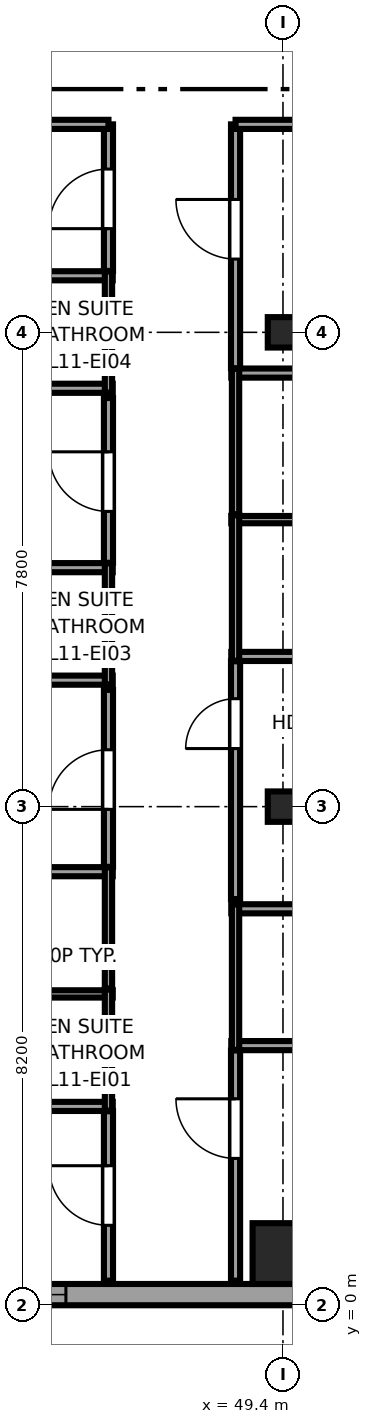
"""IFC4 building model, lengths in metres.
Left out: names, types, materials, properties, quantities, classifications, styles, units other than length and angle.
Written with IfcOpenShell. Run it as: python <this file> out.ifc"""

import sys

from ifc_helpers import new_model, si_unit, direction, frame, frame_2d, origin, origin_2d, place, context, subcontext, project, spatial, rectangle, i_section, extrude, source, transform, mapped, element, fill, save


model = new_model("IFC4")
c1 = context("Model", 3, precision=1e-05, world=origin(), true_north=direction((0.0, 1.0)))
c2 = subcontext(c1, "Body", "Model", "MODEL_VIEW")
j1 = project(units=[si_unit("LENGTHUNIT", "METRE"), si_unit("PLANEANGLEUNIT", "RADIAN")], contexts=[c1])
p1 = place(None, origin())
s1 = spatial("IfcSite", under=j1, at=p1, CompositionType="ELEMENT")
p2 = place(p1, origin())
s2 = spatial("IfcBuilding", under=s1, at=p2, CompositionType="ELEMENT")
p3 = place(p2, frame((0.0, 0.0, 49.75)))
s3 = spatial("IfcBuildingStorey", under=s2, at=p3, CompositionType="ELEMENT", Elevation=49.75)
m1 = source(origin(), c2, "Body", "SweptSolid", [
    extrude(rectangle(XDim=1.0, YDim=1.0, at=origin_2d()), origin(), (0.0, 0.0, 1.0), 3.55),
])
p4 = place(p3, frame((49.4, 0.85, 0.0), z_axis=(0.0, 0.0, 1.0), x_axis=(1.0, 0.0, 0.0)))
e1 = element("IfcColumn", 1, at=p4, inside=s3, PredefinedType="COLUMN", context=c2, shape_type="MappedRepresentation", body=[
    mapped(m1, transform((0.0, 0.0, 0.0), x_axis=(1.0, 0.0, 0.0), y_axis=(0.0, 1.0, 0.0), z_axis=(0.0, 0.0, 1.0), scale=1.0)),
])
m2 = source(origin(), c2, "Body", "SweptSolid", [
    extrude(i_section(OverallWidth=0.5, OverallDepth=0.5, WebThickness=0.028, FlangeThickness=0.045, at=origin_2d()), origin(), (0.0, 0.0, 1.0), 3.55),
])
for number, where, z_axis, x_axis in (
    (2, (49.4, 8.2, 0.0), (0.0, 0.0, 1.0), (1.0, 0.0, 0.0)),
    (3, (49.4, 16.0, 0.0), (0.0, 0.0, 1.0), (1.0, 0.0, 0.0)),
):
    element("IfcColumn", number, at=place(p3, frame(where, z_axis=z_axis, x_axis=x_axis)), inside=s3, PredefinedType="COLUMN", context=c2, shape_type="MappedRepresentation", body=[
        mapped(m2, transform((0.0, 0.0, 0.0), x_axis=(1.0, 0.0, 0.0), y_axis=(0.0, 1.0, 0.0), z_axis=(0.0, 0.0, 1.0), scale=1.0)),
    ])
p5 = place(p3, frame((34.375, 0.175, 0.0), z_axis=(0.0, 0.0, 1.0), x_axis=(1.0, 0.0, 0.0)))
e4 = element("IfcWall", 4, at=p5, inside=s3, PredefinedType="SOLIDWALL", context=c2, shape_type="SweptSolid", body=[
    extrude(rectangle(XDim=18.008, YDim=0.35, at=frame_2d((9.004, 0.0))), origin(), (0.0, 0.0, 1.0), 3.37),
])
p6 = place(p5, frame((1.801, 0.0, 0.68)))
e5 = element("IfcOpeningElement", 5, at=p6, cuts=e4, PredefinedType="OPENING", context=c2, shape_type="SweptSolid", body=[
    extrude(rectangle(XDim=1.8, YDim=1.85, at=frame_2d((0.9, 0.925))), frame((0.0, 0.185, 0.0), z_axis=(0.0, -1.0, 0.0), x_axis=(1.0, 0.0, 0.0)), (0.0, 0.0, 1.0), 0.37),
])
p7 = place(p5, frame((9.655, 0.0, 0.68)))
e6 = element("IfcOpeningElement", 6, at=p7, cuts=e4, PredefinedType="OPENING", context=c2, shape_type="SweptSolid", body=[
    extrude(rectangle(XDim=1.8, YDim=1.85, at=frame_2d((0.9, 0.925))), frame((0.0, 0.185, 0.0), z_axis=(0.0, -1.0, 0.0), x_axis=(1.0, 0.0, 0.0)), (0.0, 0.0, 1.0), 0.37),
])
p8 = place(p5, frame((15.725, 0.0, 0.62)))
e7 = element("IfcOpeningElement", 7, at=p8, cuts=e4, PredefinedType="OPENING", context=c2, shape_type="SweptSolid", body=[
    extrude(rectangle(XDim=1.5, YDim=1.55, at=frame_2d((0.75, 0.775))), frame((0.0, 0.185, 0.0), z_axis=(0.0, -1.0, 0.0), x_axis=(1.0, 0.0, 0.0)), (0.0, 0.0, 1.0), 0.37),
])
p9 = place(p3, frame((44.01, 3.27, 0.0), z_axis=(0.0, 0.0, 1.0), x_axis=(1.0, 0.0, 0.0)))
e8 = element("IfcWall", 8, at=p9, inside=s3, PredefinedType="PARTITIONING", context=c2, shape_type="SweptSolid", body=[
    extrude(rectangle(XDim=2.59, YDim=0.15, at=frame_2d((1.295, 0.0))), origin(), (0.0, 0.0, 1.0), 3.37),
])
p10 = place(p3, frame((44.01, 5.12, 0.0), z_axis=(0.0, 0.0, 1.0), x_axis=(1.0, 0.0, 0.0)))
e9 = element("IfcWall", 9, at=p10, inside=s3, PredefinedType="PLUMBINGWALL", context=c2, shape_type="SweptSolid", body=[
    extrude(rectangle(XDim=2.59, YDim=0.12, at=frame_2d((1.295, 0.0))), origin(), (0.0, 0.0, 1.0), 3.37),
])
p11 = place(p3, frame((46.53, 3.2, 0.0), z_axis=(0.0, 0.0, 1.0), x_axis=(0.0, 1.0, 0.0)))
e10 = element("IfcWall", 10, at=p11, inside=s3, PredefinedType="PLUMBINGWALL", context=c2, shape_type="SweptSolid", body=[
    extrude(rectangle(XDim=1.99, YDim=0.12, at=frame_2d((0.995, 0.0))), origin(), (0.0, 0.0, 1.0), 3.37),
])
p12 = place(p3, frame((44.01, 7.13, 0.0), z_axis=(0.0, 0.0, 1.0), x_axis=(1.0, 0.0, 0.0)))
e11 = element("IfcWall", 11, at=p12, inside=s3, PredefinedType="PARTITIONING", context=c2, shape_type="SweptSolid", body=[
    extrude(rectangle(XDim=2.59, YDim=0.15, at=frame_2d((1.295, 0.0))), origin(), (0.0, 0.0, 1.0), 3.37),
])
p13 = place(p3, frame((46.53, 5.21, 0.0), z_axis=(0.0, 0.0, 1.0), x_axis=(0.0, 1.0, 0.0)))
e12 = element("IfcWall", 12, at=p13, inside=s3, PredefinedType="PLUMBINGWALL", context=c2, shape_type="SweptSolid", body=[
    extrude(rectangle(XDim=1.99, YDim=0.12, at=frame_2d((0.995, 0.0))), origin(), (0.0, 0.0, 1.0), 3.37),
])
p14 = place(p3, frame((34.65, 10.28, 0.0), z_axis=(0.0, 0.0, 1.0), x_axis=(1.0, 0.0, 0.0)))
e13 = element("IfcWall", 13, at=p14, inside=s3, PredefinedType="PARTITIONING", context=c2, shape_type="SweptSolid", body=[
    extrude(rectangle(XDim=11.95, YDim=0.15, at=frame_2d((5.975, 0.0))), origin(), (0.0, 0.0, 1.0), 3.37),
])
p15 = place(p3, frame((44.01, 12.13, 0.0), z_axis=(0.0, 0.0, 1.0), x_axis=(1.0, 0.0, 0.0)))
e14 = element("IfcWall", 14, at=p15, inside=s3, PredefinedType="PARTITIONING", context=c2, shape_type="SweptSolid", body=[
    extrude(rectangle(XDim=2.59, YDim=0.15, at=frame_2d((1.295, 0.0))), origin(), (0.0, 0.0, 1.0), 3.37),
])
p16 = place(p3, frame((46.53, 10.21, 0.0), z_axis=(0.0, 0.0, 1.0), x_axis=(0.0, 1.0, 0.0)))
e15 = element("IfcWall", 15, at=p16, inside=s3, PredefinedType="PLUMBINGWALL", context=c2, shape_type="SweptSolid", body=[
    extrude(rectangle(XDim=1.99, YDim=0.12, at=frame_2d((0.995, 0.0))), origin(), (0.0, 0.0, 1.0), 3.37),
])
p17 = place(p3, frame((34.65, 15.08, 0.0), z_axis=(0.0, 0.0, 1.0), x_axis=(1.0, 0.0, 0.0)))
e16 = element("IfcWall", 16, at=p17, inside=s3, PredefinedType="PARTITIONING", context=c2, shape_type="SweptSolid", body=[
    extrude(rectangle(XDim=11.95, YDim=0.15, at=frame_2d((5.975, 0.0))), origin(), (0.0, 0.0, 1.0), 3.37),
])
p18 = place(p3, frame((44.01, 16.93, 0.0), z_axis=(0.0, 0.0, 1.0), x_axis=(1.0, 0.0, 0.0)))
e17 = element("IfcWall", 17, at=p18, inside=s3, PredefinedType="PARTITIONING", context=c2, shape_type="SweptSolid", body=[
    extrude(rectangle(XDim=2.59, YDim=0.15, at=frame_2d((1.295, 0.0))), origin(), (0.0, 0.0, 1.0), 3.37),
])
p19 = place(p3, frame((46.53, 15.01, 0.0), z_axis=(0.0, 0.0, 1.0), x_axis=(0.0, 1.0, 0.0)))
e18 = element("IfcWall", 18, at=p19, inside=s3, PredefinedType="PLUMBINGWALL", context=c2, shape_type="SweptSolid", body=[
    extrude(rectangle(XDim=1.99, YDim=0.12, at=frame_2d((0.995, 0.0))), origin(), (0.0, 0.0, 1.0), 3.37),
])
for number, where, z_axis, x_axis in (
    (19, (48.55, 4.27, 0.0), (0.0, 0.0, 1.0), (1.0, 0.0, 0.0)),
    (20, (48.55, 6.52, 0.0), (0.0, 0.0, 1.0), (1.0, 0.0, 0.0)),
):
    element("IfcWall", number, at=place(p3, frame(where, z_axis=z_axis, x_axis=x_axis)), inside=s3, PredefinedType="PARTITIONING", context=c2, shape_type="SweptSolid", body=[
        extrude(rectangle(XDim=2.59, YDim=0.15, at=frame_2d((1.295, 0.0))), origin(), (0.0, 0.0, 1.0), 3.37),
    ])
p20 = place(p3, frame((48.62, 4.2, 0.0), z_axis=(0.0, 0.0, 1.0), x_axis=(0.0, 1.0, 0.0)))
e21 = element("IfcWall", 21, at=p20, inside=s3, PredefinedType="PLUMBINGWALL", context=c2, shape_type="SweptSolid", body=[
    extrude(rectangle(XDim=2.39, YDim=0.12, at=frame_2d((1.195, 0.0))), origin(), (0.0, 0.0, 1.0), 3.37),
])
p21 = place(p3, frame((48.55, 10.67, 0.0), z_axis=(0.0, 0.0, 1.0), x_axis=(1.0, 0.0, 0.0)))
e22 = element("IfcWall", 22, at=p21, inside=s3, PredefinedType="PARTITIONING", context=c2, shape_type="SweptSolid", body=[
    extrude(rectangle(XDim=2.59, YDim=0.15, at=frame_2d((1.295, 0.0))), origin(), (0.0, 0.0, 1.0), 3.37),
])
p22 = place(p3, frame((48.55, 12.92, 0.0), z_axis=(0.0, 0.0, 1.0), x_axis=(1.0, 0.0, 0.0)))
e23 = element("IfcWall", 23, at=p22, inside=s3, PredefinedType="PLUMBINGWALL", context=c2, shape_type="SweptSolid", body=[
    extrude(rectangle(XDim=2.59, YDim=0.12, at=frame_2d((1.295, 0.0))), origin(), (0.0, 0.0, 1.0), 3.37),
])
p23 = place(p3, frame((48.62, 10.6, 0.0), z_axis=(0.0, 0.0, 1.0), x_axis=(0.0, 1.0, 0.0)))
e24 = element("IfcWall", 24, at=p23, inside=s3, PredefinedType="PLUMBINGWALL", context=c2, shape_type="SweptSolid", body=[
    extrude(rectangle(XDim=2.39, YDim=0.12, at=frame_2d((1.195, 0.0))), origin(), (0.0, 0.0, 1.0), 3.37),
])
p24 = place(p3, frame((48.55, 15.33, 0.0), z_axis=(0.0, 0.0, 1.0), x_axis=(1.0, 0.0, 0.0)))
e25 = element("IfcWall", 25, at=p24, inside=s3, PredefinedType="PARTITIONING", context=c2, shape_type="SweptSolid", body=[
    extrude(rectangle(XDim=2.59, YDim=0.15, at=frame_2d((1.295, 0.0))), origin(), (0.0, 0.0, 1.0), 3.37),
])
p25 = place(p3, frame((48.62, 13.01, 0.0), z_axis=(0.0, 0.0, 1.0), x_axis=(0.0, 1.0, 0.0)))
e26 = element("IfcWall", 26, at=p25, inside=s3, PredefinedType="PLUMBINGWALL", context=c2, shape_type="SweptSolid", body=[
    extrude(rectangle(XDim=2.39, YDim=0.12, at=frame_2d((1.195, 0.0))), origin(), (0.0, 0.0, 1.0), 3.37),
])
p26 = place(p3, frame((46.53, 0.405, 0.0), z_axis=(0.0, 0.0, 1.0), x_axis=(0.0, 1.0, 0.0)))
e27 = element("IfcWall", 27, at=p26, inside=s3, PredefinedType="PARTITIONING", context=c2, shape_type="SweptSolid", body=[
    extrude(rectangle(XDim=2.785, YDim=0.15, at=frame_2d((1.393, 0.0))), origin(), (0.0, 0.0, 1.0), 3.37),
])
p27 = place(p26, frame((0.91, 0.0, 0.0)))
e28 = element("IfcOpeningElement", 28, at=p27, cuts=e27, PredefinedType="OPENING", context=c2, shape_type="SweptSolid", body=[
    extrude(rectangle(XDim=0.98, YDim=2.12, at=frame_2d((0.49, 1.06))), frame((0.0, 0.085, 0.0), z_axis=(0.0, -1.0, 0.0), x_axis=(1.0, 0.0, 0.0)), (0.0, 0.0, 1.0), 0.17),
])
p28 = place(p3, frame((46.53, 7.21, 0.0), z_axis=(0.0, 0.0, 1.0), x_axis=(0.0, 1.0, 0.0)))
e29 = element("IfcWall", 29, at=p28, inside=s3, PredefinedType="PARTITIONING", context=c2, shape_type="SweptSolid", body=[
    extrude(rectangle(XDim=2.91, YDim=0.15, at=frame_2d((1.455, 0.0))), origin(), (0.0, 0.0, 1.0), 3.37),
])
p29 = place(p28, frame((0.945, 0.0, 0.0)))
e30 = element("IfcOpeningElement", 30, at=p29, cuts=e29, PredefinedType="OPENING", context=c2, shape_type="SweptSolid", body=[
    extrude(rectangle(XDim=0.98, YDim=2.12, at=frame_2d((0.49, 1.06))), frame((0.0, 0.085, 0.0), z_axis=(0.0, -1.0, 0.0), x_axis=(1.0, 0.0, 0.0)), (0.0, 0.0, 1.0), 0.17),
])
p30 = place(p3, frame((46.53, 12.21, 0.0), z_axis=(0.0, 0.0, 1.0), x_axis=(0.0, 1.0, 0.0)))
e31 = element("IfcWall", 31, at=p30, inside=s3, PredefinedType="PARTITIONING", context=c2, shape_type="SweptSolid", body=[
    extrude(rectangle(XDim=2.71, YDim=0.15, at=frame_2d((1.355, 0.0))), origin(), (0.0, 0.0, 1.0), 3.37),
])
p31 = place(p30, frame((0.845, 0.0, 0.0)))
e32 = element("IfcOpeningElement", 32, at=p31, cuts=e31, PredefinedType="OPENING", context=c2, shape_type="SweptSolid", body=[
    extrude(rectangle(XDim=0.98, YDim=2.12, at=frame_2d((0.49, 1.06))), frame((0.0, 0.085, 0.0), z_axis=(0.0, -1.0, 0.0), x_axis=(1.0, 0.0, 0.0)), (0.0, 0.0, 1.0), 0.17),
])
p32 = place(p3, frame((46.53, 17.01, 0.0), z_axis=(0.0, 0.0, 1.0), x_axis=(0.0, 1.0, 0.0)))
e33 = element("IfcWall", 33, at=p32, inside=s3, PredefinedType="PARTITIONING", context=c2, shape_type="SweptSolid", body=[
    extrude(rectangle(XDim=2.41, YDim=0.15, at=frame_2d((1.205, 0.0))), origin(), (0.0, 0.0, 1.0), 3.37),
])
p33 = place(p32, frame((0.695, 0.0, 0.0)))
e34 = element("IfcOpeningElement", 34, at=p33, cuts=e33, PredefinedType="OPENING", context=c2, shape_type="SweptSolid", body=[
    extrude(rectangle(XDim=0.98, YDim=2.12, at=frame_2d((0.49, 1.06))), frame((0.0, 0.085, 0.0), z_axis=(0.0, -1.0, 0.0), x_axis=(1.0, 0.0, 0.0)), (0.0, 0.0, 1.0), 0.17),
])
p34 = place(p3, frame((34.65, 19.42, 0.0), z_axis=(0.0, 0.0, 1.0), x_axis=(1.0, 0.0, 0.0)))
e35 = element("IfcWall", 35, at=p34, inside=s3, PredefinedType="PARTITIONING", context=c2, shape_type="SweptSolid", body=[
    extrude(rectangle(XDim=11.88, YDim=0.15, at=frame_2d((5.94, 0.0))), origin(), (0.0, 0.0, 1.0), 3.37),
])
p35 = place(p3, frame((48.62, 0.405, 0.0), z_axis=(0.0, 0.0, 1.0), x_axis=(0.0, 1.0, 0.0)))
e36 = element("IfcWall", 36, at=p35, inside=s3, PredefinedType="PARTITIONING", context=c2, shape_type="SweptSolid", body=[
    extrude(rectangle(XDim=3.785, YDim=0.15, at=frame_2d((1.893, 0.0))), origin(), (0.0, 0.0, 1.0), 3.37),
])
p36 = place(p35, frame((2.01, 0.0, 0.0)))
e37 = element("IfcOpeningElement", 37, at=p36, cuts=e36, PredefinedType="OPENING", context=c2, shape_type="SweptSolid", body=[
    extrude(rectangle(XDim=0.98, YDim=2.12, at=frame_2d((0.49, 1.06))), frame((0.0, 0.085, 0.0), z_axis=(0.0, -1.0, 0.0), x_axis=(1.0, 0.0, 0.0)), (0.0, 0.0, 1.0), 0.17),
])
p37 = place(p3, frame((48.62, 6.68, 0.0), z_axis=(0.0, 0.0, 1.0), x_axis=(0.0, 1.0, 0.0)))
e38 = element("IfcWall", 38, at=p37, inside=s3, PredefinedType="PARTITIONING", context=c2, shape_type="SweptSolid", body=[
    extrude(rectangle(XDim=3.91, YDim=0.15, at=frame_2d((1.955, 0.0))), origin(), (0.0, 0.0, 1.0), 3.37),
])
p38 = place(p37, frame((2.475, 0.0, 0.0)))
e39 = element("IfcOpeningElement", 39, at=p38, cuts=e38, PredefinedType="OPENING", context=c2, shape_type="SweptSolid", body=[
    extrude(rectangle(XDim=0.82, YDim=2.01, at=frame_2d((0.41, 1.005))), frame((0.0, 0.085, 0.0), z_axis=(0.0, -1.0, 0.0), x_axis=(1.0, 0.0, 0.0)), (0.0, 0.0, 1.0), 0.17),
])
p39 = place(p3, frame((48.62, 15.41, 0.0), z_axis=(0.0, 0.0, 1.0), x_axis=(0.0, 1.0, 0.0)))
e40 = element("IfcWall", 40, at=p39, inside=s3, PredefinedType="PARTITIONING", context=c2, shape_type="SweptSolid", body=[
    extrude(rectangle(XDim=4.01, YDim=0.15, at=frame_2d((2.005, 0.0))), origin(), (0.0, 0.0, 1.0), 3.37),
])
p40 = place(p39, frame((1.795, 0.0, 0.0)))
e41 = element("IfcOpeningElement", 41, at=p40, cuts=e40, PredefinedType="OPENING", context=c2, shape_type="SweptSolid", body=[
    extrude(rectangle(XDim=0.98, YDim=2.12, at=frame_2d((0.49, 1.06))), frame((0.0, 0.085, 0.0), z_axis=(0.0, -1.0, 0.0), x_axis=(1.0, 0.0, 0.0)), (0.0, 0.0, 1.0), 0.17),
])
p41 = place(p3, frame((48.62, 19.42, 0.0), z_axis=(0.0, 0.0, 1.0), x_axis=(1.0, 0.0, 0.0)))
e42 = element("IfcWall", 42, at=p41, inside=s3, PredefinedType="PARTITIONING", context=c2, shape_type="SweptSolid", body=[
    extrude(rectangle(XDim=7.975, YDim=0.15, at=frame_2d((3.987, 0.0))), origin(), (0.0, 0.0, 1.0), 3.37),
])
m3 = source(origin(), c2, "Body", "SweptSolid", [
    extrude(rectangle(XDim=1.8, YDim=1.85, at=frame_2d((0.9, 0.925))), frame((0.0, 0.09, 0.0), z_axis=(0.0, -1.0, 0.0), x_axis=(1.0, 0.0, 0.0)), (0.0, 0.0, 1.0), 0.06),
])
p42 = place(p7, origin())
e43 = element("IfcWindow", 43, at=p42, inside=s3, PartitioningType="TRIPLE_PANEL_HORIZONTAL", PredefinedType="WINDOW", context=c2, shape_type="MappedRepresentation", body=[
    mapped(m3, transform((0.0, 0.0, 0.0), x_axis=(1.0, 0.0, 0.0), y_axis=(0.0, 1.0, 0.0), z_axis=(0.0, 0.0, 1.0), scale=1.0)),
])
fill(e6, e43)
m4 = source(origin(), c2, "Body", "SweptSolid", [
    extrude(rectangle(XDim=0.98, YDim=2.12, at=frame_2d((0.49, 1.06))), frame((0.0, 0.025, 0.0), z_axis=(0.0, -1.0, 0.0), x_axis=(1.0, 0.0, 0.0)), (0.0, 0.0, 1.0), 0.05),
])
p43 = place(p27, origin())
e44 = element("IfcDoor", 44, at=p43, inside=s3, OperationType="SINGLE_SWING_RIGHT", PredefinedType="DOOR", context=c2, shape_type="MappedRepresentation", body=[
    mapped(m4, transform((0.0, 0.0, 0.0), x_axis=(1.0, 0.0, 0.0), y_axis=(0.0, 1.0, 0.0), z_axis=(0.0, 0.0, 1.0), scale=1.0)),
])
fill(e28, e44)
p44 = place(p29, origin())
e45 = element("IfcDoor", 45, at=p44, inside=s3, OperationType="SINGLE_SWING_LEFT", PredefinedType="DOOR", context=c2, shape_type="MappedRepresentation", body=[
    mapped(m4, transform((0.0, 0.0, 0.0), x_axis=(1.0, 0.0, 0.0), y_axis=(0.0, 1.0, 0.0), z_axis=(0.0, 0.0, 1.0), scale=1.0)),
])
fill(e30, e45)
p45 = place(p31, origin())
e46 = element("IfcDoor", 46, at=p45, inside=s3, OperationType="SINGLE_SWING_RIGHT", PredefinedType="DOOR", context=c2, shape_type="MappedRepresentation", body=[
    mapped(m4, transform((0.0, 0.0, 0.0), x_axis=(1.0, 0.0, 0.0), y_axis=(0.0, 1.0, 0.0), z_axis=(0.0, 0.0, 1.0), scale=1.0)),
])
fill(e32, e46)
p46 = place(p33, origin())
e47 = element("IfcDoor", 47, at=p46, inside=s3, OperationType="SINGLE_SWING_LEFT", PredefinedType="DOOR", context=c2, shape_type="MappedRepresentation", body=[
    mapped(m4, transform((0.0, 0.0, 0.0), x_axis=(1.0, 0.0, 0.0), y_axis=(0.0, 1.0, 0.0), z_axis=(0.0, 0.0, 1.0), scale=1.0)),
])
fill(e34, e47)
p47 = place(p36, origin())
e48 = element("IfcDoor", 48, at=p47, inside=s3, OperationType="SINGLE_SWING_RIGHT", PredefinedType="DOOR", context=c2, shape_type="MappedRepresentation", body=[
    mapped(m4, transform((0.0, 0.0, 0.0), x_axis=(1.0, 0.0, 0.0), y_axis=(0.0, 1.0, 0.0), z_axis=(0.0, 0.0, 1.0), scale=1.0)),
])
fill(e37, e48)
m5 = source(origin(), c2, "Body", "SweptSolid", [
    extrude(rectangle(XDim=0.82, YDim=2.01, at=frame_2d((0.41, 1.005))), frame((0.0, 0.025, 0.0), z_axis=(0.0, -1.0, 0.0), x_axis=(1.0, 0.0, 0.0)), (0.0, 0.0, 1.0), 0.05),
])
p48 = place(p38, origin())
e49 = element("IfcDoor", 49, at=p48, inside=s3, OperationType="SINGLE_SWING_LEFT", PredefinedType="DOOR", context=c2, shape_type="MappedRepresentation", body=[
    mapped(m5, transform((0.0, 0.0, 0.0), x_axis=(1.0, 0.0, 0.0), y_axis=(0.0, 1.0, 0.0), z_axis=(0.0, 0.0, 1.0), scale=1.0)),
])
fill(e39, e49)
p49 = place(p40, origin())
e50 = element("IfcDoor", 50, at=p49, inside=s3, OperationType="SINGLE_SWING_RIGHT", PredefinedType="DOOR", context=c2, shape_type="MappedRepresentation", body=[
    mapped(m4, transform((0.0, 0.0, 0.0), x_axis=(1.0, 0.0, 0.0), y_axis=(0.0, 1.0, 0.0), z_axis=(0.0, 0.0, 1.0), scale=1.0)),
])
fill(e41, e50)
save(model, sys.argv[1])
